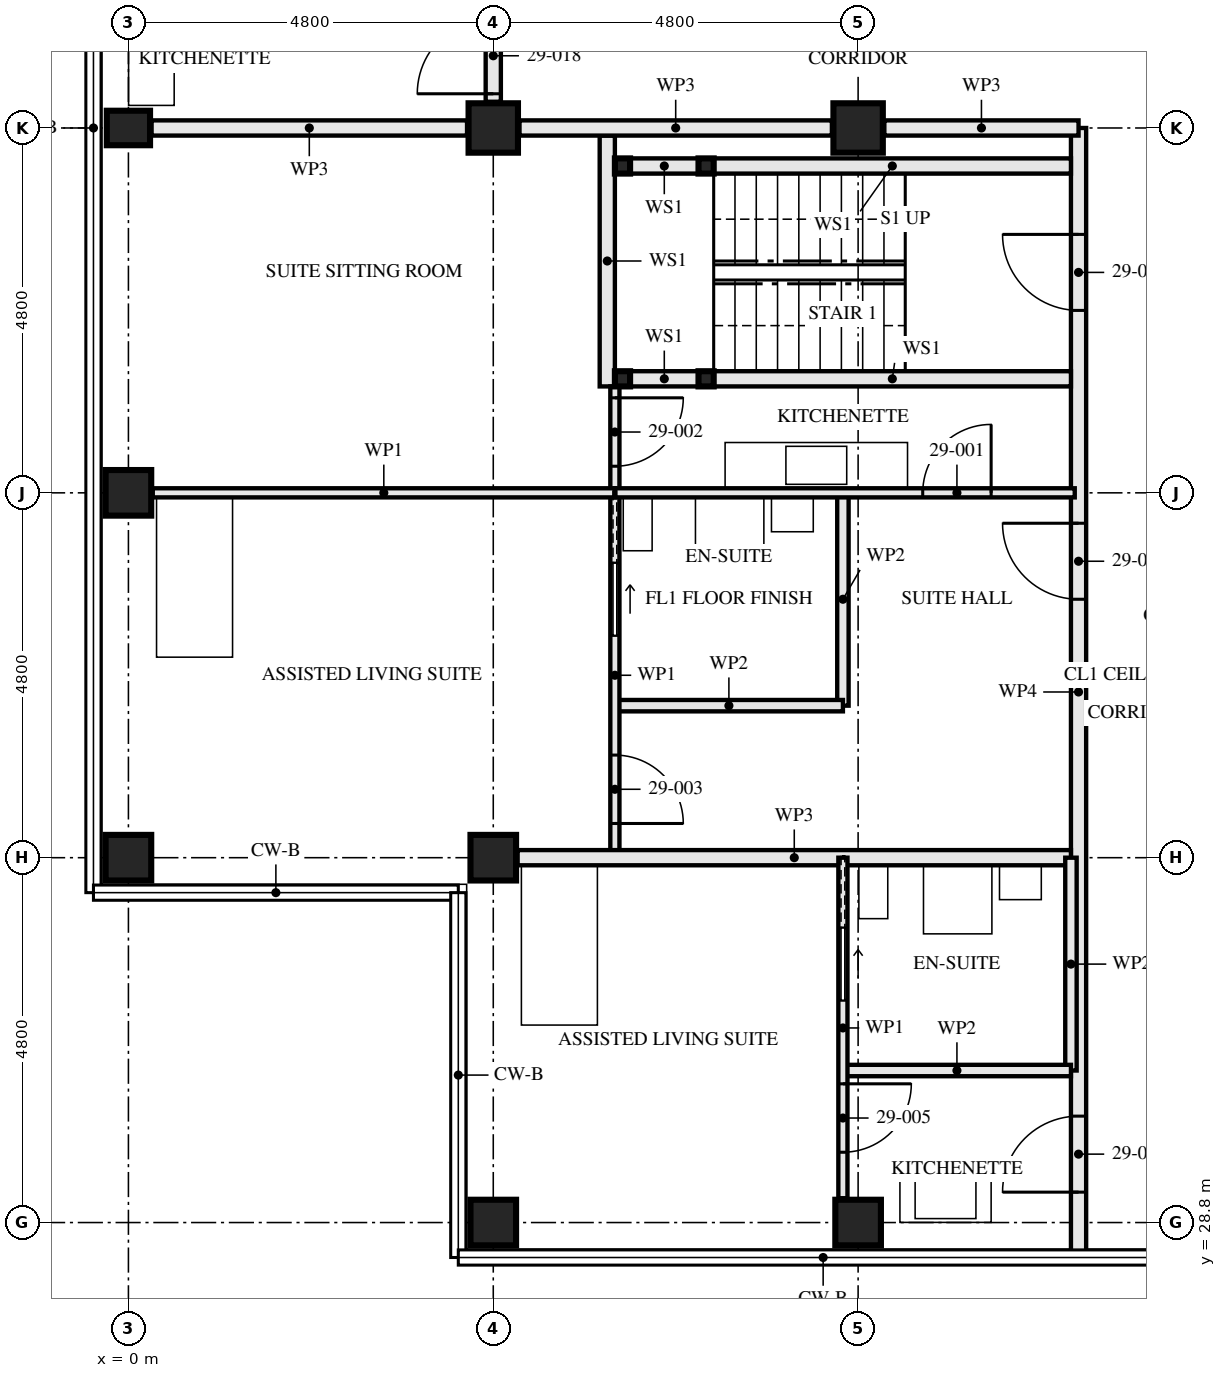
"""IFC4 building model, lengths in metres.
Left out: names, types, materials, properties, quantities, classifications, styles, units other than length and angle.
Written with IfcOpenShell. Run it as: python <this file> out.ifc"""

import sys

from ifc_helpers import new_model, si_unit, direction, frame, frame_2d, origin, origin_2d, place, context, subcontext, project, spatial, rectangle, hollow_rectangle, i_section, extrude, element, fill, save


model = new_model("IFC4")
c1 = context("Model", 3, precision=1e-05, world=origin(), true_north=direction((0.0, 1.0)))
c2 = subcontext(c1, "Body", "Model", "MODEL_VIEW")
j1 = project(units=[si_unit("LENGTHUNIT", "METRE"), si_unit("PLANEANGLEUNIT", "RADIAN")], contexts=[c1])
p1 = place(None, origin())
s1 = spatial("IfcSite", under=j1, at=p1, CompositionType="ELEMENT")
p2 = place(p1, origin())
s2 = spatial("IfcBuilding", under=s1, at=p2, CompositionType="ELEMENT")
p3 = place(p2, frame((0.0, 0.0, 108.5)))
s3 = spatial("IfcBuildingStorey", under=s2, at=p3, CompositionType="ELEMENT", Elevation=108.5)
for number, where, z_axis, x_axis in (
    (1, (0.0, 33.6, 0.0), (0.0, 0.0, 1.0), (0.0, 1.0, 0.0)),
    (2, (0.0, 38.4, 0.0), (0.0, 0.0, 1.0), (1.0, 0.0, 0.0)),
):
    element("IfcColumn", number, at=place(p3, frame(where, z_axis=z_axis, x_axis=x_axis)), inside=s3, PredefinedType="COLUMN", context=c2, shape_type="SweptSolid", body=[
        extrude(hollow_rectangle(XDim=0.6, YDim=0.6, WallThickness=0.08, at=origin_2d()), origin(), (0.0, 0.0, 1.0), 3.5),
    ])
p4 = place(p3, frame((0.0, 43.2, 0.0), z_axis=(0.0, 0.0, 1.0), x_axis=(0.0, 1.0, 0.0)))
e3 = element("IfcColumn", 3, at=p4, inside=s3, PredefinedType="COLUMN", context=c2, shape_type="SweptSolid", body=[
    extrude(i_section(OverallWidth=0.454, OverallDepth=0.569, WebThickness=0.078, FlangeThickness=0.125, FilletRadius=0.015, at=origin_2d()), origin(), (0.0, 0.0, 1.0), 3.5),
])
for number, where, z_axis, x_axis in (
    (4, (4.8, 28.8, 0.0), (0.0, 0.0, 1.0), (0.0, 1.0, 0.0)),
    (5, (4.8, 33.6, 0.0), (0.0, 0.0, 1.0), (0.0, 1.0, 0.0)),
):
    element("IfcColumn", number, at=place(p3, frame(where, z_axis=z_axis, x_axis=x_axis)), inside=s3, PredefinedType="COLUMN", context=c2, shape_type="SweptSolid", body=[
        extrude(hollow_rectangle(XDim=0.6, YDim=0.6, WallThickness=0.08, at=origin_2d()), origin(), (0.0, 0.0, 1.0), 3.5),
    ])
p5 = place(p3, frame((4.8, 43.2, 0.0), z_axis=(0.0, 0.0, 1.0), x_axis=(0.0, 1.0, 0.0)))
e6 = element("IfcColumn", 6, at=p5, inside=s3, PredefinedType="COLUMN", context=c2, shape_type="SweptSolid", body=[
    extrude(hollow_rectangle(XDim=0.65, YDim=0.65, WallThickness=0.05, at=origin_2d()), origin(), (0.0, 0.0, 1.0), 3.5),
])
p6 = place(p3, frame((9.6, 28.8, 0.0), z_axis=(0.0, 0.0, 1.0), x_axis=(0.0, 1.0, 0.0)))
e7 = element("IfcColumn", 7, at=p6, inside=s3, PredefinedType="COLUMN", context=c2, shape_type="SweptSolid", body=[
    extrude(hollow_rectangle(XDim=0.6, YDim=0.6, WallThickness=0.08, at=origin_2d()), origin(), (0.0, 0.0, 1.0), 3.5),
])
p7 = place(p3, frame((9.6, 43.2, 0.0), z_axis=(0.0, 0.0, 1.0), x_axis=(0.0, 1.0, 0.0)))
e8 = element("IfcColumn", 8, at=p7, inside=s3, PredefinedType="COLUMN", context=c2, shape_type="SweptSolid", body=[
    extrude(hollow_rectangle(XDim=0.65, YDim=0.65, WallThickness=0.05, at=origin_2d()), origin(), (0.0, 0.0, 1.0), 3.5),
])
for number, where, z_axis, x_axis in (
    (9, (6.5, 42.7, 0.0), (0.0, 0.0, 1.0), (1.0, 0.0, 0.0)),
    (10, (6.5, 39.9, 0.0), (0.0, 0.0, 1.0), (1.0, 0.0, 0.0)),
    (11, (7.6, 42.7, 0.0), (0.0, 0.0, 1.0), (1.0, 0.0, 0.0)),
    (12, (7.6, 39.9, 0.0), (0.0, 0.0, 1.0), (1.0, 0.0, 0.0)),
):
    element("IfcColumn", number, at=place(p3, frame(where, z_axis=z_axis, x_axis=x_axis)), inside=s3, PredefinedType="COLUMN", context=c2, shape_type="SweptSolid", body=[
        extrude(hollow_rectangle(XDim=0.2, YDim=0.2, WallThickness=0.008, at=origin_2d()), origin(), (0.0, 0.0, 1.0), 3.33),
    ])
p8 = place(p3, frame((6.6, 42.7, 0.0), z_axis=(0.0, 0.0, 1.0), x_axis=(1.0, 0.0, 0.0)))
e13 = element("IfcWall", 13, at=p8, inside=s3, PredefinedType="SOLIDWALL", context=c2, shape_type="SweptSolid", body=[
    extrude(rectangle(XDim=0.9, YDim=0.2, at=frame_2d((0.45, 0.0))), origin(), (0.0, 0.0, 1.0), 2.99),
])
p9 = place(p3, frame((7.7, 42.7, 0.0), z_axis=(0.0, 0.0, 1.0), x_axis=(1.0, 0.0, 0.0)))
e14 = element("IfcWall", 14, at=p9, inside=s3, PredefinedType="SOLIDWALL", context=c2, shape_type="SweptSolid", body=[
    extrude(rectangle(XDim=4.7, YDim=0.2, at=frame_2d((2.35, 0.0))), origin(), (0.0, 0.0, 1.0), 2.99),
])
p10 = place(p3, frame((6.6, 39.9, 0.0), z_axis=(0.0, 0.0, 1.0), x_axis=(1.0, 0.0, 0.0)))
e15 = element("IfcWall", 15, at=p10, inside=s3, PredefinedType="SOLIDWALL", context=c2, shape_type="SweptSolid", body=[
    extrude(rectangle(XDim=0.9, YDim=0.2, at=frame_2d((0.45, 0.0))), origin(), (0.0, 0.0, 1.0), 2.99),
])
p11 = place(p3, frame((7.7, 39.9, 0.0), z_axis=(0.0, 0.0, 1.0), x_axis=(1.0, 0.0, 0.0)))
e16 = element("IfcWall", 16, at=p11, inside=s3, PredefinedType="SOLIDWALL", context=c2, shape_type="SweptSolid", body=[
    extrude(rectangle(XDim=4.7, YDim=0.2, at=frame_2d((2.35, 0.0))), origin(), (0.0, 0.0, 1.0), 2.99),
])
p12 = place(p3, frame((6.3, 43.1, 0.0), z_axis=(0.0, 0.0, 1.0), x_axis=(0.0, -1.0, 0.0)))
e17 = element("IfcWall", 17, at=p12, inside=s3, PredefinedType="SOLIDWALL", context=c2, shape_type="SweptSolid", body=[
    extrude(rectangle(XDim=3.3, YDim=0.2, at=frame_2d((1.65, 0.0))), origin(), (0.0, 0.0, 1.0), 3.33),
])
p13 = place(p3, frame((6.4, 35.6, 0.0), z_axis=(0.0, 0.0, 1.0), x_axis=(1.0, 0.0, 0.0)))
e18 = element("IfcWall", 18, at=p13, inside=s3, PredefinedType="PARTITIONING", context=c2, shape_type="SweptSolid", body=[
    extrude(rectangle(XDim=3.0, YDim=0.15, at=frame_2d((1.5, 0.0))), origin(), (0.0, 0.0, 1.0), 3.33),
])
p14 = place(p3, frame((9.4, 38.4, 0.0), z_axis=(0.0, 0.0, 1.0), x_axis=(0.0, -1.0, 0.0)))
e19 = element("IfcWall", 19, at=p14, inside=s3, PredefinedType="PARTITIONING", context=c2, shape_type="SweptSolid", body=[
    extrude(rectangle(XDim=2.8, YDim=0.15, at=frame_2d((1.4, 0.0))), origin(), (0.0, 0.0, 1.0), 3.33),
])
p15 = place(p3, frame((6.4, 38.4, 0.0), z_axis=(0.0, 0.0, 1.0), x_axis=(1.0, 0.0, 0.0)))
e20 = element("IfcWall", 20, at=p15, inside=s3, PredefinedType="PARTITIONING", context=c2, shape_type="SweptSolid", body=[
    extrude(rectangle(XDim=6.05, YDim=0.12, at=frame_2d((3.025, 0.0))), origin(), (0.0, 0.0, 1.0), 2.55),
])
p16 = place(p15, frame((4.05, 0.0, 0.0)))
e21 = element("IfcOpeningElement", 21, at=p16, cuts=e20, PredefinedType="OPENING", context=c2, shape_type="SweptSolid", body=[
    extrude(rectangle(XDim=0.9, YDim=2.1, at=frame_2d((0.45, 1.05))), frame((0.0, 0.071, 0.0), z_axis=(0.0, -1.0, 0.0), x_axis=(1.0, 0.0, 0.0)), (0.0, 0.0, 1.0), 0.141),
])
p17 = place(p3, frame((6.4, 39.8, 0.0), z_axis=(0.0, 0.0, 1.0), x_axis=(0.0, -1.0, 0.0)))
e22 = element("IfcWall", 22, at=p17, inside=s3, PredefinedType="PARTITIONING", context=c2, shape_type="SweptSolid", body=[
    extrude(rectangle(XDim=1.4, YDim=0.12, at=frame_2d((0.7, 0.0))), origin(), (0.0, 0.0, 1.0), 3.33),
])
p18 = place(p17, frame((0.15, 0.0, 0.0)))
e23 = element("IfcOpeningElement", 23, at=p18, cuts=e22, PredefinedType="OPENING", context=c2, shape_type="SweptSolid", body=[
    extrude(rectangle(XDim=0.9, YDim=2.1, at=frame_2d((0.45, 1.05))), frame((0.0, 0.071, 0.0), z_axis=(0.0, -1.0, 0.0), x_axis=(1.0, 0.0, 0.0)), (0.0, 0.0, 1.0), 0.141),
])
p19 = place(p3, frame((6.4, 38.4, 0.0), z_axis=(0.0, 0.0, 1.0), x_axis=(0.0, -1.0, 0.0)))
e24 = element("IfcWall", 24, at=p19, inside=s3, PredefinedType="PARTITIONING", context=c2, shape_type="SweptSolid", body=[
    extrude(rectangle(XDim=4.8, YDim=0.12, at=frame_2d((2.4, 0.0))), origin(), (0.0, 0.0, 1.0), 3.33),
])
p20 = place(p19, frame((3.45, 0.0, 0.0)))
e25 = element("IfcOpeningElement", 25, at=p20, cuts=e24, PredefinedType="OPENING", context=c2, shape_type="SweptSolid", body=[
    extrude(rectangle(XDim=0.9, YDim=2.1, at=frame_2d((0.45, 1.05))), frame((0.0, 0.071, 0.0), z_axis=(0.0, -1.0, 0.0), x_axis=(1.0, 0.0, 0.0)), (0.0, 0.0, 1.0), 0.141),
])
p21 = place(p19, frame((0.925, 0.0, 0.0)))
e26 = element("IfcOpeningElement", 26, at=p21, cuts=e24, PredefinedType="OPENING", context=c2, shape_type="SweptSolid", body=[
    extrude(rectangle(XDim=0.95, YDim=2.1, at=frame_2d((0.475, 1.05))), frame((0.0, 0.071, 0.0), z_axis=(0.0, -1.0, 0.0), x_axis=(1.0, 0.0, 0.0)), (0.0, 0.0, 1.0), 0.141),
])
p22 = place(p3, frame((0.32, 38.4, 0.0), z_axis=(0.0, 0.0, 1.0), x_axis=(1.0, 0.0, 0.0)))
e27 = element("IfcWall", 27, at=p22, inside=s3, PredefinedType="PARTITIONING", context=c2, shape_type="SweptSolid", body=[
    extrude(rectangle(XDim=6.08, YDim=0.12, at=frame_2d((3.04, 0.0))), origin(), (0.0, 0.0, 1.0), 2.55),
])
p23 = place(p3, frame((5.12, 33.6, 0.0), z_axis=(0.0, 0.0, 1.0), x_axis=(1.0, 0.0, 0.0)))
e28 = element("IfcWall", 28, at=p23, inside=s3, PredefinedType="PARTITIONING", context=c2, shape_type="SweptSolid", body=[
    extrude(rectangle(XDim=7.28, YDim=0.2, at=frame_2d((3.64, 0.0))), origin(), (0.0, 0.0, 1.0), 2.55),
])
p24 = place(p3, frame((9.4, 30.8, 0.0), z_axis=(0.0, 0.0, 1.0), x_axis=(1.0, 0.0, 0.0)))
e29 = element("IfcWall", 29, at=p24, inside=s3, PredefinedType="PARTITIONING", context=c2, shape_type="SweptSolid", body=[
    extrude(rectangle(XDim=3.0, YDim=0.15, at=frame_2d((1.5, 0.0))), origin(), (0.0, 0.0, 1.0), 3.33),
])
p25 = place(p3, frame((12.4, 33.6, 0.0), z_axis=(0.0, 0.0, 1.0), x_axis=(0.0, -1.0, 0.0)))
e30 = element("IfcWall", 30, at=p25, inside=s3, PredefinedType="PARTITIONING", context=c2, shape_type="SweptSolid", body=[
    extrude(rectangle(XDim=2.8, YDim=0.15, at=frame_2d((1.4, 0.0))), origin(), (0.0, 0.0, 1.0), 3.33),
])
p26 = place(p3, frame((9.4, 33.6, 0.0), z_axis=(0.0, 0.0, 1.0), x_axis=(0.0, -1.0, 0.0)))
e31 = element("IfcWall", 31, at=p26, inside=s3, PredefinedType="PARTITIONING", context=c2, shape_type="SweptSolid", body=[
    extrude(rectangle(XDim=4.48, YDim=0.12, at=frame_2d((2.24, 0.0))), origin(), (0.0, 0.0, 1.0), 3.33),
])
p27 = place(p26, frame((2.975, 0.0, 0.0)))
e32 = element("IfcOpeningElement", 32, at=p27, cuts=e31, PredefinedType="OPENING", context=c2, shape_type="SweptSolid", body=[
    extrude(rectangle(XDim=0.9, YDim=2.1, at=frame_2d((0.45, 1.05))), frame((0.0, 0.071, 0.0), z_axis=(0.0, -1.0, 0.0), x_axis=(1.0, 0.0, 0.0)), (0.0, 0.0, 1.0), 0.141),
])
p28 = place(p26, frame((0.925, 0.0, 0.0)))
e33 = element("IfcOpeningElement", 33, at=p28, cuts=e31, PredefinedType="OPENING", context=c2, shape_type="SweptSolid", body=[
    extrude(rectangle(XDim=0.95, YDim=2.1, at=frame_2d((0.475, 1.05))), frame((0.0, 0.071, 0.0), z_axis=(0.0, -1.0, 0.0), x_axis=(1.0, 0.0, 0.0)), (0.0, 0.0, 1.0), 0.141),
])
p29 = place(p3, frame((12.5, 43.2, 0.0), z_axis=(0.0, 0.0, 1.0), x_axis=(0.0, -1.0, 0.0)))
e34 = element("IfcWall", 34, at=p29, inside=s3, PredefinedType="PARTITIONING", context=c2, shape_type="SweptSolid", body=[
    extrude(rectangle(XDim=14.84, YDim=0.2, at=frame_2d((7.42, 0.0))), origin(), (0.0, 0.0, 1.0), 2.32),
])
p30 = place(p29, frame((1.4, 0.0, 0.0)))
e35 = element("IfcOpeningElement", 35, at=p30, cuts=e34, PredefinedType="OPENING", context=c2, shape_type="SweptSolid", body=[
    extrude(rectangle(XDim=1.0, YDim=2.1, at=frame_2d((0.5, 1.05))), frame((0.0, 0.111, 0.0), z_axis=(0.0, -1.0, 0.0), x_axis=(1.0, 0.0, 0.0)), (0.0, 0.0, 1.0), 0.221),
])
p31 = place(p29, frame((5.2, 0.0, 0.0)))
e36 = element("IfcOpeningElement", 36, at=p31, cuts=e34, PredefinedType="OPENING", context=c2, shape_type="SweptSolid", body=[
    extrude(rectangle(XDim=1.0, YDim=2.1, at=frame_2d((0.5, 1.05))), frame((0.0, 0.111, 0.0), z_axis=(0.0, -1.0, 0.0), x_axis=(1.0, 0.0, 0.0)), (0.0, 0.0, 1.0), 0.221),
])
p32 = place(p29, frame((13.0, 0.0, 0.0)))
e37 = element("IfcOpeningElement", 37, at=p32, cuts=e34, PredefinedType="OPENING", context=c2, shape_type="SweptSolid", body=[
    extrude(rectangle(XDim=1.0, YDim=2.1, at=frame_2d((0.5, 1.05))), frame((0.0, 0.111, 0.0), z_axis=(0.0, -1.0, 0.0), x_axis=(1.0, 0.0, 0.0)), (0.0, 0.0, 1.0), 0.221),
])
p33 = place(p3, frame((4.8, 45.2, 0.0), z_axis=(0.0, 0.0, 1.0), x_axis=(0.0, -1.0, 0.0)))
e38 = element("IfcWall", 38, at=p33, inside=s3, PredefinedType="PARTITIONING", context=c2, shape_type="SweptSolid", body=[
    extrude(rectangle(XDim=1.655, YDim=0.2, at=frame_2d((0.828, 0.0))), origin(), (0.0, 0.0, 1.0), 3.33),
])
p34 = place(p33, frame((0.55, 0.0, 0.0)))
e39 = element("IfcOpeningElement", 39, at=p34, cuts=e38, PredefinedType="OPENING", context=c2, shape_type="SweptSolid", body=[
    extrude(rectangle(XDim=1.0, YDim=2.1, at=frame_2d((0.5, 1.05))), frame((0.0, 0.111, 0.0), z_axis=(0.0, -1.0, 0.0), x_axis=(1.0, 0.0, 0.0)), (0.0, 0.0, 1.0), 0.221),
])
p35 = place(p3, frame((12.5, 43.2, 0.0), z_axis=(0.0, 0.0, 1.0), x_axis=(-1.0, 0.0, 0.0)))
e40 = element("IfcWall", 40, at=p35, inside=s3, PredefinedType="PARTITIONING", context=c2, shape_type="SweptSolid", body=[
    extrude(rectangle(XDim=2.555, YDim=0.2, at=frame_2d((1.277, 0.0))), origin(), (0.0, 0.0, 1.0), 2.32),
])
p36 = place(p3, frame((9.255, 43.2, 0.0), z_axis=(0.0, 0.0, 1.0), x_axis=(-1.0, 0.0, 0.0)))
e41 = element("IfcWall", 41, at=p36, inside=s3, PredefinedType="PARTITIONING", context=c2, shape_type="SweptSolid", body=[
    extrude(rectangle(XDim=4.11, YDim=0.2, at=frame_2d((2.055, 0.0))), origin(), (0.0, 0.0, 1.0), 2.32),
])
p37 = place(p3, frame((4.455, 43.2, 0.0), z_axis=(0.0, 0.0, 1.0), x_axis=(-1.0, 0.0, 0.0)))
e42 = element("IfcWall", 42, at=p37, inside=s3, PredefinedType="PARTITIONING", context=c2, shape_type="SweptSolid", body=[
    extrude(rectangle(XDim=4.151, YDim=0.2, at=frame_2d((2.075, 0.0))), origin(), (0.0, 0.0, 1.0), 2.32),
])
p38 = place(p16, origin())
e43 = element("IfcDoor", 43, at=p38, inside=s3, OperationType="SINGLE_SWING_LEFT", PredefinedType="DOOR", context=c2, shape_type="SweptSolid", body=[
    extrude(rectangle(XDim=0.9, YDim=2.1, at=frame_2d((0.45, 1.05))), frame((0.0, 0.022, 0.0), z_axis=(0.0, -1.0, 0.0), x_axis=(1.0, 0.0, 0.0)), (0.0, 0.0, 1.0), 0.044),
])
fill(e21, e43)
p39 = place(p18, origin())
e44 = element("IfcDoor", 44, at=p39, inside=s3, OperationType="SINGLE_SWING_RIGHT", PredefinedType="DOOR", context=c2, shape_type="SweptSolid", body=[
    extrude(rectangle(XDim=0.9, YDim=2.1, at=frame_2d((0.45, 1.05))), frame((0.0, 0.022, 0.0), z_axis=(0.0, -1.0, 0.0), x_axis=(1.0, 0.0, 0.0)), (0.0, 0.0, 1.0), 0.044),
])
fill(e23, e44)
p40 = place(p20, origin())
e45 = element("IfcDoor", 45, at=p40, inside=s3, OperationType="SINGLE_SWING_LEFT", PredefinedType="DOOR", context=c2, shape_type="SweptSolid", body=[
    extrude(rectangle(XDim=0.9, YDim=2.1, at=frame_2d((0.45, 1.05))), frame((0.0, 0.022, 0.0), z_axis=(0.0, -1.0, 0.0), x_axis=(1.0, 0.0, 0.0)), (0.0, 0.0, 1.0), 0.044),
])
fill(e25, e45)
p41 = place(p21, origin())
e46 = element("IfcDoor", 46, at=p41, inside=s3, OperationType="SLIDING_TO_RIGHT", PredefinedType="DOOR", context=c2, shape_type="SweptSolid", body=[
    extrude(rectangle(XDim=0.95, YDim=2.1, at=frame_2d((0.475, 1.05))), frame((0.0, 0.022, 0.0), z_axis=(0.0, -1.0, 0.0), x_axis=(1.0, 0.0, 0.0)), (0.0, 0.0, 1.0), 0.044),
])
fill(e26, e46)
p42 = place(p27, origin())
e47 = element("IfcDoor", 47, at=p42, inside=s3, OperationType="SINGLE_SWING_RIGHT", PredefinedType="DOOR", context=c2, shape_type="SweptSolid", body=[
    extrude(rectangle(XDim=0.9, YDim=2.1, at=frame_2d((0.45, 1.05))), frame((0.0, 0.022, 0.0), z_axis=(0.0, -1.0, 0.0), x_axis=(1.0, 0.0, 0.0)), (0.0, 0.0, 1.0), 0.044),
])
fill(e32, e47)
p43 = place(p28, origin())
e48 = element("IfcDoor", 48, at=p43, inside=s3, OperationType="SLIDING_TO_RIGHT", PredefinedType="DOOR", context=c2, shape_type="SweptSolid", body=[
    extrude(rectangle(XDim=0.95, YDim=2.1, at=frame_2d((0.475, 1.05))), frame((0.0, 0.022, 0.0), z_axis=(0.0, -1.0, 0.0), x_axis=(1.0, 0.0, 0.0)), (0.0, 0.0, 1.0), 0.044),
])
fill(e33, e48)
p44 = place(p30, frame((1.0, 0.0, 0.0), z_axis=(0.0, 0.0, 1.0), x_axis=(-1.0, 0.0, 0.0)))
e49 = element("IfcDoor", 49, at=p44, inside=s3, OperationType="SINGLE_SWING_LEFT", PredefinedType="DOOR", context=c2, shape_type="SweptSolid", body=[
    extrude(rectangle(XDim=1.0, YDim=2.1, at=frame_2d((0.5, 1.05))), frame((0.0, 0.032, 0.0), z_axis=(0.0, -1.0, 0.0), x_axis=(1.0, 0.0, 0.0)), (0.0, 0.0, 1.0), 0.064),
])
fill(e35, e49)
p45 = place(p31, frame((1.0, 0.0, 0.0), z_axis=(0.0, 0.0, 1.0), x_axis=(-1.0, 0.0, 0.0)))
e50 = element("IfcDoor", 50, at=p45, inside=s3, OperationType="SINGLE_SWING_LEFT", PredefinedType="DOOR", context=c2, shape_type="SweptSolid", body=[
    extrude(rectangle(XDim=1.0, YDim=2.1, at=frame_2d((0.5, 1.05))), frame((0.0, 0.027, 0.0), z_axis=(0.0, -1.0, 0.0), x_axis=(1.0, 0.0, 0.0)), (0.0, 0.0, 1.0), 0.054),
])
fill(e36, e50)
p46 = place(p32, frame((1.0, 0.0, 0.0), z_axis=(0.0, 0.0, 1.0), x_axis=(-1.0, 0.0, 0.0)))
e51 = element("IfcDoor", 51, at=p46, inside=s3, OperationType="SINGLE_SWING_RIGHT", PredefinedType="DOOR", context=c2, shape_type="SweptSolid", body=[
    extrude(rectangle(XDim=1.0, YDim=2.1, at=frame_2d((0.5, 1.05))), frame((0.0, 0.027, 0.0), z_axis=(0.0, -1.0, 0.0), x_axis=(1.0, 0.0, 0.0)), (0.0, 0.0, 1.0), 0.054),
])
fill(e37, e51)
p47 = place(p34, frame((1.0, 0.0, 0.0), z_axis=(0.0, 0.0, 1.0), x_axis=(-1.0, 0.0, 0.0)))
e52 = element("IfcDoor", 52, at=p47, inside=s3, OperationType="SINGLE_SWING_RIGHT", PredefinedType="DOOR", context=c2, shape_type="SweptSolid", body=[
    extrude(rectangle(XDim=1.0, YDim=2.1, at=frame_2d((0.5, 1.05))), frame((0.0, 0.027, 0.0), z_axis=(0.0, -1.0, 0.0), x_axis=(1.0, 0.0, 0.0)), (0.0, 0.0, 1.0), 0.054),
])
fill(e39, e52)
save(model, sys.argv[1])
